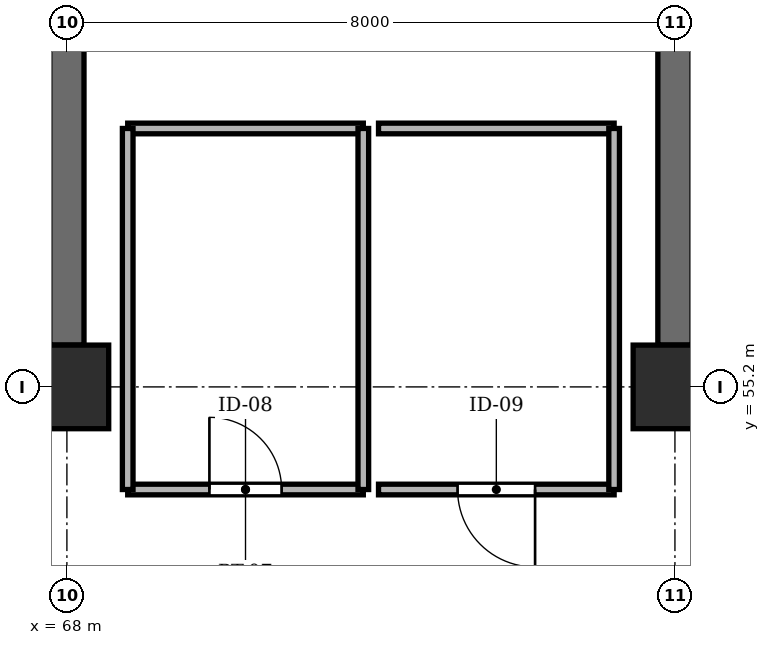
"""IFC4 building model, lengths in metres.
Left out: names, types, materials, properties, quantities, classifications, styles, units other than length and angle.
Written with IfcOpenShell. Run it as: python <this file> out.ifc"""

import sys

from ifc_helpers import new_model, si_unit, direction, frame, frame_2d, origin, origin_2d, place, context, subcontext, project, spatial, rectangle, extrude, element, fill, save


model = new_model("IFC4")
c1 = context("Model", 3, precision=1e-05, world=origin(), true_north=direction((0.0, 1.0)))
c2 = subcontext(c1, "Body", "Model", "MODEL_VIEW")
j1 = project(units=[si_unit("LENGTHUNIT", "METRE"), si_unit("PLANEANGLEUNIT", "RADIAN")], contexts=[c1])
p1 = place(None, origin())
s1 = spatial("IfcSite", under=j1, at=p1, CompositionType="ELEMENT")
p2 = place(p1, origin())
s2 = spatial("IfcBuilding", under=s1, at=p2, CompositionType="ELEMENT")
p3 = place(p2, frame((0.0, 0.0, 30.8)))
s3 = spatial("IfcBuildingStorey", under=s2, at=p3, CompositionType="ELEMENT", Elevation=30.8)
for number, where, z_axis, x_axis in (
    (1, (68.0, 55.2, -0.26), (0.0, 0.0, 1.0), (1.0, 0.0, 0.0)),
    (2, (76.0, 55.2, -0.26), (0.0, 0.0, 1.0), (1.0, 0.0, 0.0)),
):
    element("IfcColumn", number, at=place(p3, frame(where, z_axis=z_axis, x_axis=x_axis)), inside=s3, PredefinedType="COLUMN", context=c2, shape_type="SweptSolid", body=[
        extrude(rectangle(XDim=1.1, YDim=1.1, at=origin_2d()), origin(), (0.0, 0.0, 1.0), 3.26),
    ])
for number, where, z_axis, x_axis in (
    (3, (68.0, 55.75, 0.0), (0.0, 0.0, 1.0), (0.0, 1.0, 0.0)),
    (4, (76.0, 55.75, 0.0), (0.0, 0.0, 1.0), (0.0, 1.0, 0.0)),
):
    element("IfcWall", number, at=place(p3, frame(where, z_axis=z_axis, x_axis=x_axis)), inside=s3, PredefinedType="SHEAR", context=c2, shape_type="SweptSolid", body=[
        extrude(rectangle(XDim=6.2, YDim=0.45, at=frame_2d((3.1, 0.0))), origin(), (0.0, 0.0, 1.0), 3.0),
    ])
p4 = place(p3, frame((68.8, 53.85, 0.0), z_axis=(0.0, 0.0, 1.0), x_axis=(1.0, 0.0, 0.0)))
e5 = element("IfcWall", 5, at=p4, inside=s3, PredefinedType="PARTITIONING", context=c2, shape_type="SweptSolid", body=[
    extrude(rectangle(XDim=3.1, YDim=0.14, at=frame_2d((1.55, 0.0))), origin(), (0.0, 0.0, 1.0), 2.53),
])
p5 = place(p4, frame((1.075, 0.0, 0.0)))
e6 = element("IfcOpeningElement", 6, at=p5, cuts=e5, PredefinedType="OPENING", context=c2, shape_type="SweptSolid", body=[
    extrude(rectangle(XDim=0.95, YDim=2.1, at=frame_2d((0.475, 1.05))), frame((0.0, 0.082, 0.0), z_axis=(0.0, -1.0, 0.0), x_axis=(1.0, 0.0, 0.0)), (0.0, 0.0, 1.0), 0.164),
])
p6 = place(p3, frame((68.8, 58.6, 0.0), z_axis=(0.0, 0.0, 1.0), x_axis=(1.0, 0.0, 0.0)))
e7 = element("IfcWall", 7, at=p6, inside=s3, PredefinedType="PARTITIONING", context=c2, shape_type="SweptSolid", body=[
    extrude(rectangle(XDim=3.1, YDim=0.14, at=frame_2d((1.55, 0.0))), origin(), (0.0, 0.0, 1.0), 2.53),
])
for number, where, z_axis, x_axis in (
    (8, (68.8, 53.85, 0.0), (0.0, 0.0, 1.0), (0.0, 1.0, 0.0)),
    (9, (71.9, 53.85, 0.0), (0.0, 0.0, 1.0), (0.0, 1.0, 0.0)),
):
    element("IfcWall", number, at=place(p3, frame(where, z_axis=z_axis, x_axis=x_axis)), inside=s3, PredefinedType="PARTITIONING", context=c2, shape_type="SweptSolid", body=[
        extrude(rectangle(XDim=4.75, YDim=0.14, at=frame_2d((2.375, 0.0))), origin(), (0.0, 0.0, 1.0), 2.53),
    ])
p7 = place(p3, frame((72.1, 53.85, 0.0), z_axis=(0.0, 0.0, 1.0), x_axis=(1.0, 0.0, 0.0)))
e10 = element("IfcWall", 10, at=p7, inside=s3, PredefinedType="PARTITIONING", context=c2, shape_type="SweptSolid", body=[
    extrude(rectangle(XDim=3.1, YDim=0.14, at=frame_2d((1.55, 0.0))), origin(), (0.0, 0.0, 1.0), 2.53),
])
p8 = place(p7, frame((1.04, 0.0, 0.0)))
e11 = element("IfcOpeningElement", 11, at=p8, cuts=e10, PredefinedType="OPENING", context=c2, shape_type="SweptSolid", body=[
    extrude(rectangle(XDim=1.02, YDim=2.1, at=frame_2d((0.51, 1.05))), frame((0.0, 0.082, 0.0), z_axis=(0.0, -1.0, 0.0), x_axis=(1.0, 0.0, 0.0)), (0.0, 0.0, 1.0), 0.164),
])
p9 = place(p3, frame((72.1, 58.6, 0.0), z_axis=(0.0, 0.0, 1.0), x_axis=(1.0, 0.0, 0.0)))
e12 = element("IfcWall", 12, at=p9, inside=s3, PredefinedType="PARTITIONING", context=c2, shape_type="SweptSolid", body=[
    extrude(rectangle(XDim=3.1, YDim=0.14, at=frame_2d((1.55, 0.0))), origin(), (0.0, 0.0, 1.0), 2.53),
])
p10 = place(p3, frame((75.2, 53.85, 0.0), z_axis=(0.0, 0.0, 1.0), x_axis=(0.0, 1.0, 0.0)))
e13 = element("IfcWall", 13, at=p10, inside=s3, PredefinedType="PARTITIONING", context=c2, shape_type="SweptSolid", body=[
    extrude(rectangle(XDim=4.75, YDim=0.14, at=frame_2d((2.375, 0.0))), origin(), (0.0, 0.0, 1.0), 2.53),
])
p11 = place(p5, origin())
e14 = element("IfcDoor", 14, at=p11, inside=s3, OperationType="SINGLE_SWING_LEFT", PredefinedType="DOOR", context=c2, shape_type="SweptSolid", body=[
    extrude(rectangle(XDim=0.95, YDim=2.1, at=frame_2d((0.475, 1.05))), frame((0.0, 0.025, 0.0), z_axis=(0.0, -1.0, 0.0), x_axis=(1.0, 0.0, 0.0)), (0.0, 0.0, 1.0), 0.05),
])
fill(e6, e14)
p12 = place(p8, frame((1.02, 0.0, 0.0), z_axis=(0.0, 0.0, 1.0), x_axis=(-1.0, 0.0, 0.0)))
e15 = element("IfcDoor", 15, at=p12, inside=s3, OperationType="SINGLE_SWING_RIGHT", PredefinedType="DOOR", context=c2, shape_type="SweptSolid", body=[
    extrude(rectangle(XDim=1.02, YDim=2.1, at=frame_2d((0.51, 1.05))), frame((0.0, 0.025, 0.0), z_axis=(0.0, -1.0, 0.0), x_axis=(1.0, 0.0, 0.0)), (0.0, 0.0, 1.0), 0.05),
])
fill(e11, e15)
save(model, sys.argv[1])
